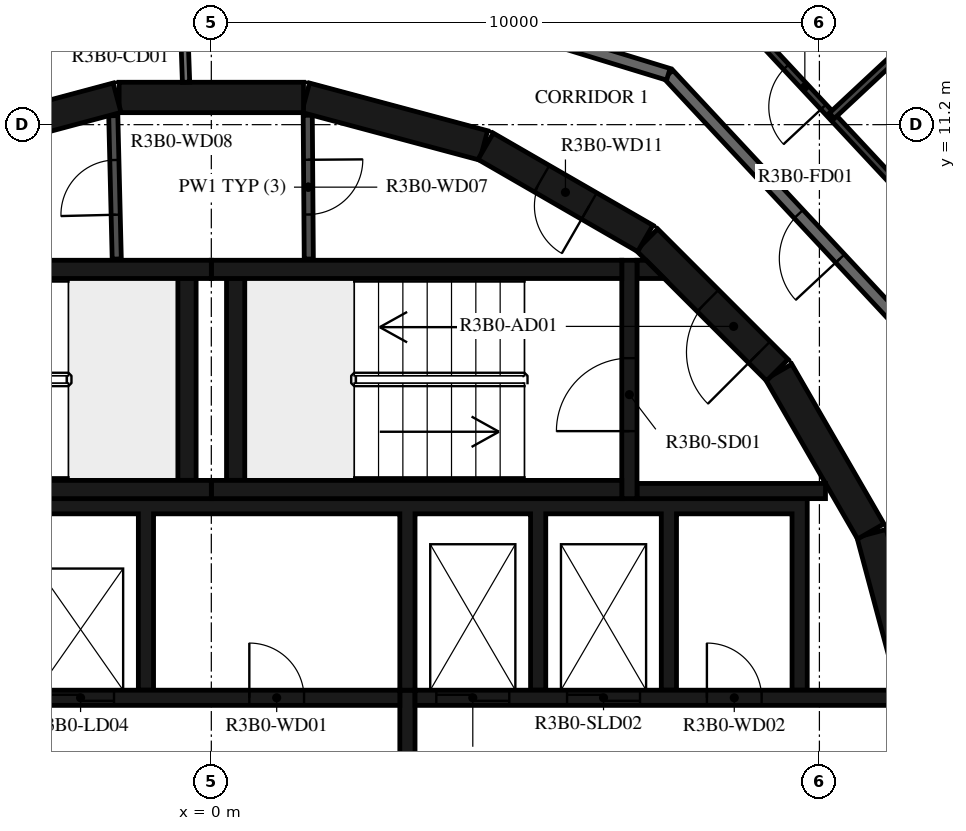
"""IFC4 building model, lengths in metres.
Left out: names, types, materials, properties, quantities, classifications, styles, units other than length and angle.
Written with IfcOpenShell. Run it as: python <this file> out.ifc"""

import sys

from ifc_helpers import new_model, si_unit, direction, frame, frame_2d, origin, place, context, subcontext, project, spatial, polyline, rectangle, outline, extrude, element, fill, save


model = new_model("IFC4")
c1 = context("Model", 3, precision=1e-05, world=origin(), true_north=direction((0.0, 1.0)))
c2 = subcontext(c1, "Body", "Model", "MODEL_VIEW")
j1 = project(units=[si_unit("LENGTHUNIT", "METRE"), si_unit("PLANEANGLEUNIT", "RADIAN")], contexts=[c1])
p1 = place(None, origin())
s1 = spatial("IfcSite", under=j1, at=p1, CompositionType="ELEMENT")
p2 = place(p1, origin())
s2 = spatial("IfcBuilding", under=s1, at=p2, CompositionType="ELEMENT")
p3 = place(p2, frame((0.0, 0.0, 127.4)))
s3 = spatial("IfcBuildingStorey", under=s2, at=p3, CompositionType="ELEMENT", Elevation=127.4)
for number, where, z_axis, x_axis in (
    (1, (11.643, 1.55, 0.0), (0.0, 0.0, 1.0), (-0.259, 0.966, 0.0)),
    (2, (10.845, 4.51, 0.0), (0.0, 0.0, 1.0), (-0.5, 0.866, 0.0)),
):
    element("IfcWall", number, at=place(p3, frame(where, z_axis=z_axis, x_axis=x_axis)), inside=s3, PredefinedType="SHEAR", context=c2, shape_type="SweptSolid", body=[
        extrude(rectangle(XDim=3.033, YDim=0.5, at=frame_2d((1.516, 0.0))), origin(), (0.0, 0.0, 1.0), 3.12),
    ])
p4 = place(p3, frame((9.308, 7.164, 0.0), z_axis=(0.0, 0.0, 1.0), x_axis=(-0.707106781187, 0.707106781187, 0.0)))
e3 = element("IfcWall", 3, at=p4, inside=s3, PredefinedType="SHEAR", context=c2, shape_type="SweptSolid", body=[
    extrude(rectangle(XDim=3.032, YDim=0.5, at=frame_2d((1.516, 0.0))), origin(), (0.0, 0.0, 1.0), 3.12),
])
p5 = place(p4, frame((0.416, 0.0, 0.0)))
e4 = element("IfcOpeningElement", 4, at=p5, cuts=e3, PredefinedType="OPENING", context=c2, shape_type="SweptSolid", body=[
    extrude(rectangle(XDim=1.2, YDim=2.1, at=frame_2d((0.6, 1.05))), frame((0.0, 0.26, 0.0), z_axis=(0.0, -1.0, 0.0), x_axis=(1.0, 0.0, 0.0)), (0.0, 0.0, 1.0), 0.52),
])
p6 = place(p3, frame((7.137, 9.329, 0.0), z_axis=(0.0, 0.0, 1.0), x_axis=(-0.865975092491, 0.500087131594, 0.0)))
e5 = element("IfcWall", 5, at=p6, inside=s3, PredefinedType="SHEAR", context=c2, shape_type="SweptSolid", body=[
    extrude(rectangle(XDim=3.033, YDim=0.5, at=frame_2d((1.516, 0.0))), origin(), (0.0, 0.0, 1.0), 3.12),
])
p7 = place(p6, frame((1.066, 0.0, 0.0)))
e6 = element("IfcOpeningElement", 6, at=p7, cuts=e5, PredefinedType="OPENING", context=c2, shape_type="SweptSolid", body=[
    extrude(rectangle(XDim=0.9, YDim=2.1, at=frame_2d((0.45, 1.05))), frame((0.0, 0.26, 0.0), z_axis=(0.0, -1.0, 0.0), x_axis=(1.0, 0.0, 0.0)), (0.0, 0.0, 1.0), 0.52),
])
for number, where, z_axis, x_axis in (
    (7, (4.479, 10.858, 0.0), (0.0, 0.0, 1.0), (-0.966, 0.259, 0.0)),
    (8, (1.516, 11.647, 0.0), (0.0, 0.0, 1.0), (-1.0, 0.0, 0.0)),
    (9, (-1.55, 11.643, 0.0), (0.0, 0.0, 1.0), (-0.966, -0.259, 0.0)),
):
    element("IfcWall", number, at=place(p3, frame(where, z_axis=z_axis, x_axis=x_axis)), inside=s3, PredefinedType="SHEAR", context=c2, shape_type="SweptSolid", body=[
        extrude(rectangle(XDim=3.033, YDim=0.5, at=frame_2d((1.516, 0.0))), origin(), (0.0, 0.0, 1.0), 3.12),
    ])
for number, where, z_axis, x_axis in (
    (10, (0.0, 5.2, 0.0), (0.0, 0.0, 1.0), (1.0, 0.0, 0.0)),
    (11, (0.0, 8.82, 0.0), (0.0, 0.0, 1.0), (1.0, 0.0, 0.0)),
):
    element("IfcWall", number, at=place(p3, frame(where, z_axis=z_axis, x_axis=x_axis)), inside=s3, PredefinedType="SHEAR", context=c2, shape_type="SweptSolid", body=[
        extrude(rectangle(XDim=6.75, YDim=0.3, at=frame_2d((3.375, 0.0))), origin(), (0.0, 0.0, 1.0), 3.12),
    ])
p8 = place(p3, frame((0.4, 5.35, 0.0), z_axis=(0.0, 0.0, 1.0), x_axis=(0.0, 1.0, 0.0)))
e12 = element("IfcWall", 12, at=p8, inside=s3, PredefinedType="SHEAR", context=c2, shape_type="SweptSolid", body=[
    extrude(rectangle(XDim=3.32, YDim=0.3, at=frame_2d((1.66, 0.0))), origin(), (0.0, 0.0, 1.0), 3.12),
])
p9 = place(p3, frame((6.875, 5.05, 0.0), z_axis=(0.0, 0.0, 1.0), x_axis=(0.0, 1.0, 0.0)))
e13 = element("IfcWall", 13, at=p9, inside=s3, PredefinedType="SHEAR", context=c2, shape_type="SweptSolid", body=[
    extrude(rectangle(XDim=3.92, YDim=0.25, at=frame_2d((1.96, 0.0))), origin(), (0.0, 0.0, 1.0), 3.12),
])
p10 = place(p9, frame((1.11, 0.0, 0.0)))
e14 = element("IfcOpeningElement", 14, at=p10, cuts=e13, PredefinedType="OPENING", context=c2, shape_type="SweptSolid", body=[
    extrude(rectangle(XDim=1.2, YDim=2.1, at=frame_2d((0.6, 1.05))), frame((0.0, 0.135, 0.0), z_axis=(0.0, -1.0, 0.0), x_axis=(1.0, 0.0, 0.0)), (0.0, 0.0, 1.0), 0.27),
])
p11 = place(p3, frame((7.0, 5.175, 0.0), z_axis=(0.0, 0.0, 1.0), x_axis=(1.0, 0.0, 0.0)))
e15 = element("IfcWall", 15, at=p11, inside=s3, PredefinedType="SHEAR", context=c2, shape_type="SweptSolid", body=[
    extrude(rectangle(XDim=3.1, YDim=0.25, at=frame_2d((1.55, 0.0))), origin(), (0.0, 0.0, 1.0), 3.12),
])
p12 = place(p3, origin())
e16 = element("IfcWall", 16, at=p12, inside=s3, PredefinedType="SHEAR", context=c2, shape_type="SweptSolid", body=[
    extrude(outline(polyline([(7.448, 8.67), (7.0, 8.67), (7.0, 8.97), (7.148, 8.97), (7.448, 8.67)])), origin(), (0.0, 0.0, 1.0), 3.12),
])
for number, where, z_axis, x_axis in (
    (17, (-6.75, 5.2, 0.0), (0.0, 0.0, 1.0), (1.0, 0.0, 0.0)),
    (18, (-6.75, 8.82, 0.0), (0.0, 0.0, 1.0), (1.0, 0.0, 0.0)),
):
    element("IfcWall", number, at=place(p3, frame(where, z_axis=z_axis, x_axis=x_axis)), inside=s3, PredefinedType="SHEAR", context=c2, shape_type="SweptSolid", body=[
        extrude(rectangle(XDim=6.75, YDim=0.3, at=frame_2d((3.375, 0.0))), origin(), (0.0, 0.0, 1.0), 3.12),
    ])
p13 = place(p3, frame((-0.4, 5.35, 0.0), z_axis=(0.0, 0.0, 1.0), x_axis=(0.0, 1.0, 0.0)))
e19 = element("IfcWall", 19, at=p13, inside=s3, PredefinedType="SHEAR", context=c2, shape_type="SweptSolid", body=[
    extrude(rectangle(XDim=3.32, YDim=0.3, at=frame_2d((1.66, 0.0))), origin(), (0.0, 0.0, 1.0), 3.12),
])
p14 = place(p3, origin())
e20 = element("IfcWall", 20, at=p14, inside=s3, PredefinedType="SHEAR", context=c2, shape_type="SweptSolid", body=[
    extrude(outline(polyline([(-9.55, 4.8), (-7.65, 4.8), (-7.65, 1.9), (-7.4, 1.9), (-7.4, 4.8), (-5.5, 4.8), (-5.5, 1.9), (-5.25, 1.9), (-5.25, 4.8), (-3.35, 4.8), (-3.35, 1.9), (-3.1, 1.9), (-3.1, 4.8), (-1.2, 4.8), (-1.2, 1.9), (-0.95, 1.9), (-0.95, 4.8), (3.1, 4.8), (3.1, 1.9), (3.35, 1.9), (3.35, 4.8), (5.25, 4.8), (5.25, 1.9), (5.5, 1.9), (5.5, 4.8), (7.4, 4.8), (7.4, 1.9), (7.65, 1.9), (7.65, 4.8), (9.55, 4.8), (9.55, 1.9), (9.8, 1.9), (9.8, 4.8), (9.8, 5.05), (-9.8, 5.05), (-9.8, 4.8), (-9.8, 1.9), (-9.55, 1.9), (-9.55, 4.8)])), origin(), (0.0, 0.0, 1.0), 3.12),
])
p15 = place(p3, frame((-11.28, 1.775, 0.0), z_axis=(0.0, 0.0, 1.0), x_axis=(1.0, 0.0, 0.0)))
e21 = element("IfcWall", 21, at=p15, inside=s3, PredefinedType="SHEAR", context=c2, shape_type="SweptSolid", body=[
    extrude(rectangle(XDim=14.38, YDim=0.25, at=frame_2d((7.19, 0.0))), origin(), (0.0, 0.0, 1.0), 3.12),
])
p16 = place(p15, frame((2.13, 0.0, 0.0)))
e22 = element("IfcOpeningElement", 22, at=p16, cuts=e21, PredefinedType="OPENING", context=c2, shape_type="SweptSolid", body=[
    extrude(rectangle(XDim=1.1, YDim=2.1, at=frame_2d((0.55, 1.05))), frame((0.0, 0.135, 0.0), z_axis=(0.0, -1.0, 0.0), x_axis=(1.0, 0.0, 0.0)), (0.0, 0.0, 1.0), 0.27),
])
p17 = place(p15, frame((4.28, 0.0, 0.0)))
e23 = element("IfcOpeningElement", 23, at=p17, cuts=e21, PredefinedType="OPENING", context=c2, shape_type="SweptSolid", body=[
    extrude(rectangle(XDim=1.1, YDim=2.1, at=frame_2d((0.55, 1.05))), frame((0.0, 0.135, 0.0), z_axis=(0.0, -1.0, 0.0), x_axis=(1.0, 0.0, 0.0)), (0.0, 0.0, 1.0), 0.27),
])
p18 = place(p15, frame((6.43, 0.0, 0.0)))
e24 = element("IfcOpeningElement", 24, at=p18, cuts=e21, PredefinedType="OPENING", context=c2, shape_type="SweptSolid", body=[
    extrude(rectangle(XDim=1.1, YDim=2.1, at=frame_2d((0.55, 1.05))), frame((0.0, 0.135, 0.0), z_axis=(0.0, -1.0, 0.0), x_axis=(1.0, 0.0, 0.0)), (0.0, 0.0, 1.0), 0.27),
])
p19 = place(p15, frame((8.58, 0.0, 0.0)))
e25 = element("IfcOpeningElement", 25, at=p19, cuts=e21, PredefinedType="OPENING", context=c2, shape_type="SweptSolid", body=[
    extrude(rectangle(XDim=1.1, YDim=2.1, at=frame_2d((0.55, 1.05))), frame((0.0, 0.135, 0.0), z_axis=(0.0, -1.0, 0.0), x_axis=(1.0, 0.0, 0.0)), (0.0, 0.0, 1.0), 0.27),
])
p20 = place(p15, frame((11.905, 0.0, 0.0)))
e26 = element("IfcOpeningElement", 26, at=p20, cuts=e21, PredefinedType="OPENING", context=c2, shape_type="SweptSolid", body=[
    extrude(rectangle(XDim=0.9, YDim=2.1, at=frame_2d((0.45, 1.05))), frame((0.0, 0.135, 0.0), z_axis=(0.0, -1.0, 0.0), x_axis=(1.0, 0.0, 0.0)), (0.0, 0.0, 1.0), 0.27),
])
p21 = place(p3, frame((3.35, 1.775, 0.0), z_axis=(0.0, 0.0, 1.0), x_axis=(1.0, 0.0, 0.0)))
e27 = element("IfcWall", 27, at=p21, inside=s3, PredefinedType="SHEAR", context=c2, shape_type="SweptSolid", body=[
    extrude(rectangle(XDim=7.93, YDim=0.25, at=frame_2d((3.965, 0.0))), origin(), (0.0, 0.0, 1.0), 3.12),
])
p22 = place(p21, frame((0.35, 0.0, 0.0)))
e28 = element("IfcOpeningElement", 28, at=p22, cuts=e27, PredefinedType="OPENING", context=c2, shape_type="SweptSolid", body=[
    extrude(rectangle(XDim=1.2, YDim=2.4, at=frame_2d((0.6, 1.2))), frame((0.0, 0.135, 0.0), z_axis=(0.0, -1.0, 0.0), x_axis=(1.0, 0.0, 0.0)), (0.0, 0.0, 1.0), 0.27),
])
p23 = place(p21, frame((2.5, 0.0, 0.0)))
e29 = element("IfcOpeningElement", 29, at=p23, cuts=e27, PredefinedType="OPENING", context=c2, shape_type="SweptSolid", body=[
    extrude(rectangle(XDim=1.2, YDim=2.4, at=frame_2d((0.6, 1.2))), frame((0.0, 0.135, 0.0), z_axis=(0.0, -1.0, 0.0), x_axis=(1.0, 0.0, 0.0)), (0.0, 0.0, 1.0), 0.27),
])
p24 = place(p21, frame((4.8, 0.0, 0.0)))
e30 = element("IfcOpeningElement", 30, at=p24, cuts=e27, PredefinedType="OPENING", context=c2, shape_type="SweptSolid", body=[
    extrude(rectangle(XDim=0.9, YDim=2.1, at=frame_2d((0.45, 1.05))), frame((0.0, 0.135, 0.0), z_axis=(0.0, -1.0, 0.0), x_axis=(1.0, 0.0, 0.0)), (0.0, 0.0, 1.0), 0.27),
])
p25 = place(p3, frame((3.225, -1.9, 0.0), z_axis=(0.0, 0.0, 1.0), x_axis=(0.0, 1.0, 0.0)))
e31 = element("IfcWall", 31, at=p25, inside=s3, PredefinedType="SHEAR", context=c2, shape_type="SweptSolid", body=[
    extrude(rectangle(XDim=3.8, YDim=0.25, at=frame_2d((1.9, 0.0))), origin(), (0.0, 0.0, 1.0), 3.12),
])
p26 = place(p3, frame((1.586, 11.354, 0.0), z_axis=(0.0, 0.0, 1.0), x_axis=(0.007227482881, -0.999973881405, 0.0)))
e32 = element("IfcWall", 32, at=p26, inside=s3, PredefinedType="PARTITIONING", context=c2, shape_type="SweptSolid", body=[
    extrude(rectangle(XDim=2.365, YDim=0.15, at=frame_2d((1.182, 0.0))), origin(), (0.0, 0.0, 1.0), 3.12),
])
p27 = place(p26, frame((0.732, 0.0, 0.0)))
e33 = element("IfcOpeningElement", 33, at=p27, cuts=e32, PredefinedType="OPENING", context=c2, shape_type="SweptSolid", body=[
    extrude(rectangle(XDim=0.9, YDim=2.1, at=frame_2d((0.45, 1.05))), frame((0.0, 0.085, 0.0), z_axis=(0.0, -1.0, 0.0), x_axis=(1.0, 0.0, 0.0)), (0.0, 0.0, 1.0), 0.17),
])
p28 = place(p3, frame((-1.555, 8.99, 0.0), z_axis=(0.0, 0.0, 1.0), x_axis=(-0.024125549686, 0.999708936567, 0.0)))
e34 = element("IfcWall", 34, at=p28, inside=s3, PredefinedType="PARTITIONING", context=c2, shape_type="SweptSolid", body=[
    extrude(rectangle(XDim=2.358, YDim=0.15, at=frame_2d((1.179, 0.0))), origin(), (0.0, 0.0, 1.0), 3.12),
])
p29 = place(p28, frame((0.729, 0.0, 0.0)))
e35 = element("IfcOpeningElement", 35, at=p29, cuts=e34, PredefinedType="OPENING", context=c2, shape_type="SweptSolid", body=[
    extrude(rectangle(XDim=0.9, YDim=2.1, at=frame_2d((0.45, 1.05))), frame((0.0, 0.085, 0.0), z_axis=(0.0, -1.0, 0.0), x_axis=(1.0, 0.0, 0.0)), (0.0, 0.0, 1.0), 0.17),
])
p30 = place(p3, frame((-0.487, 13.948, 0.0), z_axis=(0.0, 0.0, 1.0), x_axis=(0.034859752231, -0.999392214135, 0.0)))
e36 = element("IfcWall", 36, at=p30, inside=s3, PredefinedType="PARTITIONING", context=c2, shape_type="SweptSolid", body=[
    extrude(rectangle(XDim=2.052, YDim=0.12, at=frame_2d((1.026, 0.0))), origin(), (0.0, 0.0, 1.0), 3.12),
])
p31 = place(p30, frame((0.125, 0.0, 0.0)))
e37 = element("IfcOpeningElement", 37, at=p31, cuts=e36, PredefinedType="OPENING", context=c2, shape_type="SweptSolid", body=[
    extrude(rectangle(XDim=1.2, YDim=2.1, at=frame_2d((0.6, 1.05))), frame((0.0, 0.07, 0.0), z_axis=(0.0, -1.0, 0.0), x_axis=(1.0, 0.0, 0.0)), (0.0, 0.0, 1.0), 0.14),
])
p32 = place(p3, frame((12.523, 6.659, 0.0), z_axis=(0.0, 0.0, 1.0), x_axis=(-0.682001841105, 0.731350455479, 0.0)))
e38 = element("IfcWall", 38, at=p32, inside=s3, PredefinedType="STANDARD", context=c2, shape_type="SweptSolid", body=[
    extrude(rectangle(XDim=7.342, YDim=0.2, at=frame_2d((3.671, 0.0))), origin(), (0.0, 0.0, 1.0), 3.12),
])
p33 = place(p32, frame((3.2, 0.0, 0.0)))
e39 = element("IfcOpeningElement", 39, at=p33, cuts=e38, PredefinedType="OPENING", context=c2, shape_type="SweptSolid", body=[
    extrude(rectangle(XDim=1.0, YDim=2.1, at=frame_2d((0.5, 1.05))), frame((0.0, 0.11, 0.0), z_axis=(0.0, -1.0, 0.0), x_axis=(1.0, 0.0, 0.0)), (0.0, 0.0, 1.0), 0.22),
])
p34 = place(p3, frame((7.516, 12.028, 0.0), z_axis=(0.0, 0.0, 1.0), x_axis=(-0.956306642771, 0.292365533182, 0.0)))
e40 = element("IfcWall", 40, at=p34, inside=s3, PredefinedType="STANDARD", context=c2, shape_type="SweptSolid", body=[
    extrude(rectangle(XDim=7.342, YDim=0.2, at=frame_2d((3.671, 0.0))), origin(), (0.0, 0.0, 1.0), 3.12),
])
p35 = place(p3, frame((13.254, 8.075, 0.0), z_axis=(0.0, 0.0, 1.0), x_axis=(-0.681995901471, 0.731355994285, 0.0)))
e41 = element("IfcWall", 41, at=p35, inside=s3, PredefinedType="PARTITIONING", context=c2, shape_type="SweptSolid", body=[
    extrude(rectangle(XDim=7.207, YDim=0.12, at=frame_2d((3.603, 0.0))), origin(), (0.0, 0.0, 1.0), 3.12),
])
p36 = place(p35, frame((4.672, 0.0, 0.0)))
e42 = element("IfcOpeningElement", 42, at=p36, cuts=e41, PredefinedType="OPENING", context=c2, shape_type="SweptSolid", body=[
    extrude(rectangle(XDim=0.9, YDim=2.1, at=frame_2d((0.45, 1.05))), frame((0.0, 0.07, 0.0), z_axis=(0.0, -1.0, 0.0), x_axis=(1.0, 0.0, 0.0)), (0.0, 0.0, 1.0), 0.14),
])
p37 = place(p3, frame((12.903, 13.862, 0.0), z_axis=(0.0, 0.0, 1.0), x_axis=(-0.731380732155, -0.68196937221, 0.0)))
e43 = element("IfcWall", 43, at=p37, inside=s3, PredefinedType="PARTITIONING", context=c2, shape_type="SweptSolid", body=[
    extrude(rectangle(XDim=3.691, YDim=0.12, at=frame_2d((1.845, 0.0))), origin(), (0.0, 0.0, 1.0), 2.73),
])
p38 = place(p10, origin())
e44 = element("IfcDoor", 44, at=p38, inside=s3, OperationType="SINGLE_SWING_LEFT", PredefinedType="DOOR", context=c2, shape_type="SweptSolid", body=[
    extrude(rectangle(XDim=1.2, YDim=2.1, at=frame_2d((0.6, 1.05))), frame((0.0, 0.025, 0.0), z_axis=(0.0, -1.0, 0.0), x_axis=(1.0, 0.0, 0.0)), (0.0, 0.0, 1.0), 0.05),
])
fill(e14, e44)
p39 = place(p5, origin())
e45 = element("IfcDoor", 45, at=p39, inside=s3, OperationType="SINGLE_SWING_RIGHT", PredefinedType="DOOR", context=c2, shape_type="SweptSolid", body=[
    extrude(rectangle(XDim=1.2, YDim=2.1, at=frame_2d((0.6, 1.05))), frame((0.0, 0.025, 0.0), z_axis=(0.0, -1.0, 0.0), x_axis=(1.0, 0.0, 0.0)), (0.0, 0.0, 1.0), 0.05),
])
fill(e4, e45)
p40 = place(p19, origin())
e46 = element("IfcDoor", 46, at=p40, inside=s3, OperationType="DOUBLE_DOOR_SLIDING", PredefinedType="DOOR", context=c2, shape_type="SweptSolid", body=[
    extrude(rectangle(XDim=1.1, YDim=2.1, at=frame_2d((0.55, 1.05))), frame((0.0, 0.025, 0.0), z_axis=(0.0, -1.0, 0.0), x_axis=(1.0, 0.0, 0.0)), (0.0, 0.0, 1.0), 0.05),
])
fill(e25, e46)
p41 = place(p22, origin())
e47 = element("IfcDoor", 47, at=p41, inside=s3, OperationType="DOUBLE_DOOR_SLIDING", PredefinedType="DOOR", context=c2, shape_type="SweptSolid", body=[
    extrude(rectangle(XDim=1.2, YDim=2.4, at=frame_2d((0.6, 1.2))), frame((0.0, 0.025, 0.0), z_axis=(0.0, -1.0, 0.0), x_axis=(1.0, 0.0, 0.0)), (0.0, 0.0, 1.0), 0.05),
])
fill(e28, e47)
p42 = place(p23, origin())
e48 = element("IfcDoor", 48, at=p42, inside=s3, OperationType="DOUBLE_DOOR_SLIDING", PredefinedType="DOOR", context=c2, shape_type="SweptSolid", body=[
    extrude(rectangle(XDim=1.2, YDim=2.4, at=frame_2d((0.6, 1.2))), frame((0.0, 0.025, 0.0), z_axis=(0.0, -1.0, 0.0), x_axis=(1.0, 0.0, 0.0)), (0.0, 0.0, 1.0), 0.05),
])
fill(e29, e48)
p43 = place(p20, origin())
e49 = element("IfcDoor", 49, at=p43, inside=s3, OperationType="SINGLE_SWING_RIGHT", PredefinedType="DOOR", context=c2, shape_type="SweptSolid", body=[
    extrude(rectangle(XDim=0.9, YDim=2.1, at=frame_2d((0.45, 1.05))), frame((0.0, 0.025, 0.0), z_axis=(0.0, -1.0, 0.0), x_axis=(1.0, 0.0, 0.0)), (0.0, 0.0, 1.0), 0.05),
])
fill(e26, e49)
p44 = place(p24, origin())
e50 = element("IfcDoor", 50, at=p44, inside=s3, OperationType="SINGLE_SWING_LEFT", PredefinedType="DOOR", context=c2, shape_type="SweptSolid", body=[
    extrude(rectangle(XDim=0.9, YDim=2.1, at=frame_2d((0.45, 1.05))), frame((0.0, 0.025, 0.0), z_axis=(0.0, -1.0, 0.0), x_axis=(1.0, 0.0, 0.0)), (0.0, 0.0, 1.0), 0.05),
])
fill(e30, e50)
p45 = place(p27, origin())
e51 = element("IfcDoor", 51, at=p45, inside=s3, OperationType="SINGLE_SWING_RIGHT", PredefinedType="DOOR", context=c2, shape_type="SweptSolid", body=[
    extrude(rectangle(XDim=0.9, YDim=2.1, at=frame_2d((0.45, 1.05))), frame((0.0, 0.025, 0.0), z_axis=(0.0, -1.0, 0.0), x_axis=(1.0, 0.0, 0.0)), (0.0, 0.0, 1.0), 0.05),
])
fill(e33, e51)
p46 = place(p29, origin())
e52 = element("IfcDoor", 52, at=p46, inside=s3, OperationType="SINGLE_SWING_LEFT", PredefinedType="DOOR", context=c2, shape_type="SweptSolid", body=[
    extrude(rectangle(XDim=0.9, YDim=2.1, at=frame_2d((0.45, 1.05))), frame((0.0, 0.025, 0.0), z_axis=(0.0, -1.0, 0.0), x_axis=(1.0, 0.0, 0.0)), (0.0, 0.0, 1.0), 0.05),
])
fill(e35, e52)
p47 = place(p7, origin())
e53 = element("IfcDoor", 53, at=p47, inside=s3, OperationType="SINGLE_SWING_RIGHT", PredefinedType="DOOR", context=c2, shape_type="SweptSolid", body=[
    extrude(rectangle(XDim=0.9, YDim=2.1, at=frame_2d((0.45, 1.05))), frame((0.0, 0.025, 0.0), z_axis=(0.0, -1.0, 0.0), x_axis=(1.0, 0.0, 0.0)), (0.0, 0.0, 1.0), 0.05),
])
fill(e6, e53)
p48 = place(p33, origin())
e54 = element("IfcDoor", 54, at=p48, inside=s3, OperationType="SINGLE_SWING_RIGHT", PredefinedType="DOOR", context=c2, shape_type="SweptSolid", body=[
    extrude(rectangle(XDim=1.0, YDim=2.1, at=frame_2d((0.5, 1.05))), frame((0.0, 0.025, 0.0), z_axis=(0.0, -1.0, 0.0), x_axis=(1.0, 0.0, 0.0)), (0.0, 0.0, 1.0), 0.05),
])
fill(e39, e54)
p49 = place(p36, origin())
e55 = element("IfcDoor", 55, at=p49, inside=s3, OperationType="SINGLE_SWING_RIGHT", PredefinedType="DOOR", context=c2, shape_type="SweptSolid", body=[
    extrude(rectangle(XDim=0.9, YDim=2.1, at=frame_2d((0.45, 1.05))), frame((0.0, 0.025, 0.0), z_axis=(0.0, -1.0, 0.0), x_axis=(1.0, 0.0, 0.0)), (0.0, 0.0, 1.0), 0.05),
])
fill(e42, e55)
save(model, sys.argv[1])
